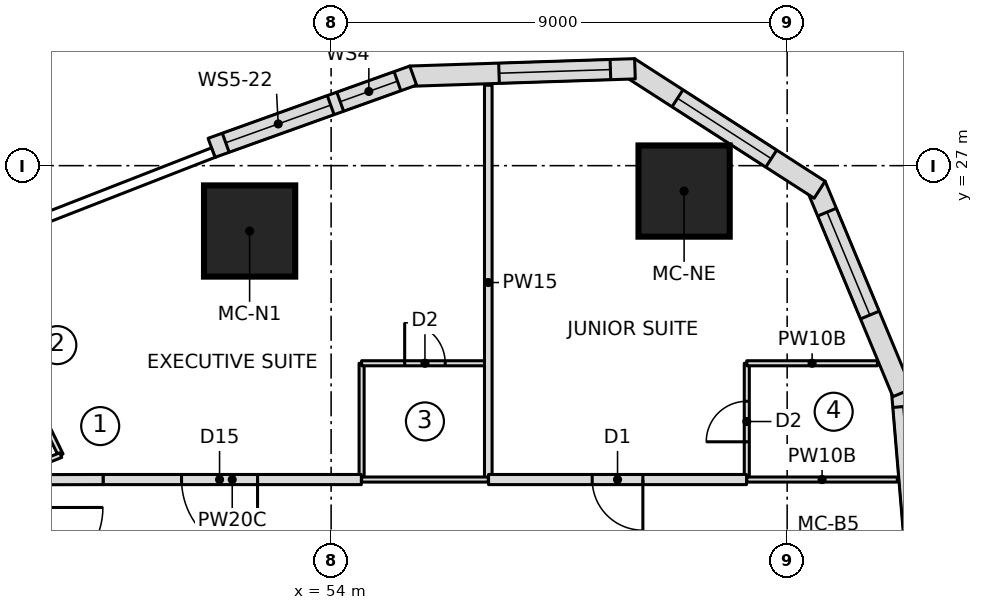
"""IFC4 building model, lengths in metres.
Left out: names, types, materials, properties, quantities, classifications, styles, units other than length and angle.
Written with IfcOpenShell. Run it as: python <this file> out.ifc"""

import sys

from ifc_helpers import new_model, si_unit, direction, frame, frame_2d, origin, origin_2d, place, context, subcontext, project, spatial, polyline, rectangle, outline, extrude, element, fill, save


model = new_model("IFC4")
c1 = context("Model", 3, precision=1e-05, world=origin(), true_north=direction((0.0, 1.0)))
c2 = subcontext(c1, "Body", "Model", "MODEL_VIEW")
j1 = project(units=[si_unit("LENGTHUNIT", "METRE"), si_unit("PLANEANGLEUNIT", "RADIAN")], contexts=[c1])
p1 = place(None, origin())
s1 = spatial("IfcSite", under=j1, at=p1, CompositionType="ELEMENT")
p2 = place(p1, origin())
s2 = spatial("IfcBuilding", under=s1, at=p2, CompositionType="ELEMENT")
p3 = place(p2, frame((0.0, 0.0, 50.25)))
s3 = spatial("IfcBuildingStorey", under=s2, at=p3, CompositionType="ELEMENT", Elevation=50.25)
for number, where, z_axis, x_axis in (
    (1, (60.966, 26.499, 0.0), (0.0, 0.0, 1.0), (1.0, 0.0, 0.0)),
    (2, (52.392, 25.71, 0.0), (0.0, 0.0, 1.0), (1.0, 0.0, 0.0)),
):
    element("IfcColumn", number, at=place(p3, frame(where, z_axis=z_axis, x_axis=x_axis)), inside=s3, PredefinedType="COLUMN", context=c2, shape_type="SweptSolid", body=[
        extrude(rectangle(XDim=1.8, YDim=1.8, at=origin_2d()), origin(), (0.0, 0.0, 1.0), 3.55),
    ])
p4 = place(p3, frame((65.603, 18.455, 0.0), z_axis=(0.0, 0.0, 1.0), x_axis=(-0.083793550906, 0.996483136248, 0.0)))
e3 = element("IfcWall", 3, at=p4, inside=s3, PredefinedType="NOTDEFINED", context=c2, shape_type="SweptSolid", body=[
    extrude(outline(polyline([(-0.002, -0.2), (4.136, -0.2), (4.074, 0.2), (0.002, 0.2), (-0.002, -0.2)])), origin(), (0.0, 0.0, 1.0), 3.25),
])
p5 = place(p4, frame((0.302, 0.0, 0.9)))
e4 = element("IfcOpeningElement", 4, at=p5, cuts=e3, PredefinedType="OPENING", context=c2, shape_type="SweptSolid", body=[
    extrude(rectangle(XDim=3.5, YDim=1.8, at=frame_2d((1.75, 0.9))), frame((0.0, 0.21, 0.0), z_axis=(0.0, -1.0, 0.0), x_axis=(1.0, 0.0, 0.0)), (0.0, 0.0, 1.0), 0.42),
])
p6 = place(p3, frame((65.259, 22.546, 0.0), z_axis=(0.0, 0.0, 1.0), x_axis=(-0.384372042685, 0.923178277908, 0.0)))
e5 = element("IfcWall", 5, at=p6, inside=s3, PredefinedType="NOTDEFINED", context=c2, shape_type="SweptSolid", body=[
    extrude(outline(polyline([(-0.031, -0.2), (4.408, -0.2), (4.283, 0.2), (0.031, 0.2), (-0.031, -0.2)])), origin(), (0.0, 0.0, 1.0), 3.25),
])
p7 = place(p6, frame((1.631, 0.0, 0.6)))
e6 = element("IfcOpeningElement", 6, at=p7, cuts=e5, PredefinedType="OPENING", context=c2, shape_type="SweptSolid", body=[
    extrude(outline(polyline([(0.0, 1.35), (0.084, 1.771), (0.322, 2.128), (0.679, 2.366), (1.1, 2.45), (1.521, 2.366), (1.878, 2.128), (2.116, 1.771), (2.2, 1.35), (2.2, 1.1), (2.116, 0.679), (1.878, 0.322), (1.521, 0.084), (1.1, 0.0), (0.679, 0.084), (0.322, 0.322), (0.084, 0.679), (0.0, 1.1), (0.0, 1.35)])), frame((0.0, 0.21, 0.0), z_axis=(0.0, -1.0, 0.0), x_axis=(1.0, 0.0, 0.0)), (0.0, 0.0, 1.0), 0.42),
])
p8 = place(p3, frame((63.588, 26.558, 0.0), z_axis=(0.0, 0.0, 1.0), x_axis=(-0.840937468718, 0.541132307025, 0.0)))
e7 = element("IfcWall", 7, at=p8, inside=s3, PredefinedType="NOTDEFINED", context=c2, shape_type="SweptSolid", body=[
    extrude(outline(polyline([(-0.062, -0.2), (4.409, -0.2), (4.284, 0.2), (0.062, 0.2), (-0.062, -0.2)])), origin(), (0.0, 0.0, 1.0), 3.25),
])
p9 = place(p8, frame((1.073, 0.0, 0.6)))
e8 = element("IfcOpeningElement", 8, at=p9, cuts=e7, PredefinedType="OPENING", context=c2, shape_type="SweptSolid", body=[
    extrude(outline(polyline([(0.0, 1.35), (0.084, 1.771), (0.322, 2.128), (0.679, 2.366), (1.1, 2.45), (1.521, 2.366), (1.878, 2.128), (2.116, 1.771), (2.2, 1.35), (2.2, 1.1), (2.116, 0.679), (1.878, 0.322), (1.521, 0.084), (1.1, 0.0), (0.679, 0.084), (0.322, 0.322), (0.084, 0.679), (0.0, 1.1), (0.0, 1.35)])), frame((0.0, 0.21, 0.0), z_axis=(0.0, -1.0, 0.0), x_axis=(1.0, 0.0, 0.0)), (0.0, 0.0, 1.0), 0.42),
])
p10 = place(p3, frame((59.934, 28.91, 0.0), z_axis=(0.0, 0.0, 1.0), x_axis=(-0.999463576228, -0.032749958686, 0.0)))
e9 = element("IfcWall", 9, at=p10, inside=s3, PredefinedType="NOTDEFINED", context=c2, shape_type="SweptSolid", body=[
    extrude(outline(polyline([(-0.062, -0.2), (4.378, -0.2), (4.315, 0.2), (0.062, 0.2), (-0.062, -0.2)])), origin(), (0.0, 0.0, 1.0), 3.25),
])
p11 = place(p10, frame((0.422, 0.0, 0.6)))
e10 = element("IfcOpeningElement", 10, at=p11, cuts=e9, PredefinedType="OPENING", context=c2, shape_type="SweptSolid", body=[
    extrude(outline(polyline([(0.0, 1.35), (0.084, 1.771), (0.322, 2.128), (0.679, 2.366), (1.1, 2.45), (1.521, 2.366), (1.878, 2.128), (2.116, 1.771), (2.2, 1.35), (2.2, 1.1), (2.116, 0.679), (1.878, 0.322), (1.521, 0.084), (1.1, 0.0), (0.679, 0.084), (0.322, 0.322), (0.084, 0.679), (0.0, 1.1), (0.0, 1.35)])), frame((0.0, 0.21, 0.0), z_axis=(0.0, -1.0, 0.0), x_axis=(1.0, 0.0, 0.0)), (0.0, 0.0, 1.0), 0.42),
])
p12 = place(p3, frame((55.59, 28.768, 0.0), z_axis=(0.0, 0.0, 1.0), x_axis=(-0.941339752885, -0.337460323057, 0.0)))
e11 = element("IfcWall", 11, at=p12, inside=s3, PredefinedType="NOTDEFINED", context=c2, shape_type="SweptSolid", body=[
    extrude(outline(polyline([(-0.031, -0.2), (4.196, -0.2), (4.196, 0.2), (0.031, 0.2), (-0.031, -0.2)])), origin(), (0.0, 0.0, 1.0), 3.25),
])
p13 = place(p12, frame((0.298, 0.0, 0.9)))
e12 = element("IfcOpeningElement", 12, at=p13, cuts=e11, PredefinedType="OPENING", context=c2, shape_type="SweptSolid", body=[
    extrude(rectangle(XDim=1.2, YDim=1.8, at=frame_2d((0.6, 0.9))), frame((0.0, 0.21, 0.0), z_axis=(0.0, -1.0, 0.0), x_axis=(1.0, 0.0, 0.0)), (0.0, 0.0, 1.0), 0.42),
])
p14 = place(p12, frame((1.698, 0.0, 0.9)))
e13 = element("IfcOpeningElement", 13, at=p14, cuts=e11, PredefinedType="OPENING", context=c2, shape_type="SweptSolid", body=[
    extrude(rectangle(XDim=2.2, YDim=1.8, at=frame_2d((1.1, 0.9))), frame((0.0, 0.21, 0.0), z_axis=(0.0, -1.0, 0.0), x_axis=(1.0, 0.0, 0.0)), (0.0, 0.0, 1.0), 0.42),
])
p15 = place(p3, frame((54.602, 20.8, 0.0), z_axis=(0.0, 0.0, 1.0), x_axis=(0.0, 1.0, 0.0)))
e14 = element("IfcWall", 14, at=p15, inside=s3, PredefinedType="PARTITIONING", context=c2, shape_type="SweptSolid", body=[
    extrude(rectangle(XDim=2.3, YDim=0.1, at=frame_2d((1.15, 0.0))), origin(), (0.0, 0.0, 1.0), 3.25),
])
p16 = place(p3, frame((54.602, 23.1, 0.0), z_axis=(0.0, 0.0, 1.0), x_axis=(1.0, 0.0, 0.0)))
e15 = element("IfcWall", 15, at=p16, inside=s3, PredefinedType="PARTITIONING", context=c2, shape_type="SweptSolid", body=[
    extrude(rectangle(XDim=2.5, YDim=0.1, at=frame_2d((1.25, 0.0))), origin(), (0.0, 0.0, 1.0), 3.25),
])
p17 = place(p16, frame((0.85, 0.0, 0.0)))
e16 = element("IfcOpeningElement", 16, at=p17, cuts=e15, PredefinedType="OPENING", context=c2, shape_type="SweptSolid", body=[
    extrude(rectangle(XDim=0.8, YDim=2.1, at=frame_2d((0.4, 1.05))), frame((0.0, 0.06, 0.0), z_axis=(0.0, -1.0, 0.0), x_axis=(1.0, 0.0, 0.0)), (0.0, 0.0, 1.0), 0.12),
])
p18 = place(p3, frame((62.203, 20.8, 0.0), z_axis=(0.0, 0.0, 1.0), x_axis=(0.0, 1.0, 0.0)))
e17 = element("IfcWall", 17, at=p18, inside=s3, PredefinedType="PARTITIONING", context=c2, shape_type="SweptSolid", body=[
    extrude(rectangle(XDim=2.3, YDim=0.1, at=frame_2d((1.15, 0.0))), origin(), (0.0, 0.0, 1.0), 3.25),
])
p19 = place(p18, frame((0.75, 0.0, 0.0)))
e18 = element("IfcOpeningElement", 18, at=p19, cuts=e17, PredefinedType="OPENING", context=c2, shape_type="SweptSolid", body=[
    extrude(rectangle(XDim=0.8, YDim=2.1, at=frame_2d((0.4, 1.05))), frame((0.0, 0.06, 0.0), z_axis=(0.0, -1.0, 0.0), x_axis=(1.0, 0.0, 0.0)), (0.0, 0.0, 1.0), 0.12),
])
p20 = place(p3, frame((62.203, 23.1, 0.0), z_axis=(0.0, 0.0, 1.0), x_axis=(1.0, 0.0, 0.0)))
e19 = element("IfcWall", 19, at=p20, inside=s3, PredefinedType="PARTITIONING", context=c2, shape_type="SweptSolid", body=[
    extrude(rectangle(XDim=2.578, YDim=0.1, at=frame_2d((1.289, 0.0))), origin(), (0.0, 0.0, 1.0), 3.25),
])
p21 = place(p3, frame((57.102, 20.8, 0.0), z_axis=(0.0, 0.0, 1.0), x_axis=(0.0, 1.0, 0.0)))
e20 = element("IfcWall", 20, at=p21, inside=s3, PredefinedType="PARTITIONING", context=c2, shape_type="SweptSolid", body=[
    extrude(rectangle(XDim=7.787, YDim=0.15, at=frame_2d((3.894, 0.0))), origin(), (0.0, 0.0, 1.0), 3.25),
])
p22 = place(p3, frame((47.655, 23.361, 0.0), z_axis=(0.0, 0.0, 1.0), x_axis=(0.438171240168, -0.898891519756, 0.0)))
e21 = element("IfcWall", 21, at=p22, inside=s3, PredefinedType="PARTITIONING", context=c2, shape_type="SweptSolid", body=[
    extrude(rectangle(XDim=2.306, YDim=0.1, at=frame_2d((1.153, 0.0))), origin(), (0.0, 0.0, 1.0), 3.25),
])
p23 = place(p3, frame((48.665, 21.288, 0.0), z_axis=(0.0, 0.0, 1.0), x_axis=(-0.928288495333, -0.371860819975, 0.0)))
e22 = element("IfcWall", 22, at=p23, inside=s3, PredefinedType="PARTITIONING", context=c2, shape_type="SweptSolid", body=[
    extrude(rectangle(XDim=2.507, YDim=0.1, at=frame_2d((1.253, 0.0))), origin(), (0.0, 0.0, 1.0), 3.25),
])
p24 = place(p23, frame((1.25, 0.0, 0.0)))
e23 = element("IfcOpeningElement", 23, at=p24, cuts=e22, PredefinedType="OPENING", context=c2, shape_type="SweptSolid", body=[
    extrude(rectangle(XDim=0.8, YDim=2.1, at=frame_2d((0.4, 1.05))), frame((0.0, 0.06, 0.0), z_axis=(0.0, -1.0, 0.0), x_axis=(1.0, 0.0, 0.0)), (0.0, 0.0, 1.0), 0.12),
])
p25 = place(p3, frame((54.597, 20.805, 0.0), z_axis=(0.0, 0.0, 1.0), x_axis=(-1.0, 0.0, 0.0)))
e24 = element("IfcWall", 24, at=p25, inside=s3, PredefinedType="PARTITIONING", context=c2, shape_type="SweptSolid", body=[
    extrude(rectangle(XDim=5.097, YDim=0.2, at=frame_2d((2.548, 0.0))), origin(), (0.0, 0.0, 1.0), 3.25),
])
p26 = place(p25, frame((2.048, 0.0, 0.0)))
e25 = element("IfcOpeningElement", 25, at=p26, cuts=e24, PredefinedType="OPENING", context=c2, shape_type="SweptSolid", body=[
    extrude(rectangle(XDim=1.5, YDim=2.1, at=frame_2d((0.75, 1.05))), frame((0.0, 0.11, 0.0), z_axis=(0.0, -1.0, 0.0), x_axis=(1.0, 0.0, 0.0)), (0.0, 0.0, 1.0), 0.22),
])
p27 = place(p3, frame((62.198, 20.805, 0.0), z_axis=(0.0, 0.0, 1.0), x_axis=(-1.0, 0.0, 0.0)))
e26 = element("IfcWall", 26, at=p27, inside=s3, PredefinedType="PARTITIONING", context=c2, shape_type="SweptSolid", body=[
    extrude(rectangle(XDim=5.092, YDim=0.2, at=frame_2d((2.546, 0.0))), origin(), (0.0, 0.0, 1.0), 3.25),
])
p28 = place(p27, frame((2.046, 0.0, 0.0)))
e27 = element("IfcOpeningElement", 27, at=p28, cuts=e26, PredefinedType="OPENING", context=c2, shape_type="SweptSolid", body=[
    extrude(rectangle(XDim=1.0, YDim=2.1, at=frame_2d((0.5, 1.05))), frame((0.0, 0.11, 0.0), z_axis=(0.0, -1.0, 0.0), x_axis=(1.0, 0.0, 0.0)), (0.0, 0.0, 1.0), 0.22),
])
p29 = place(p3, frame((57.102, 20.805, 0.0), z_axis=(0.0, 0.0, 1.0), x_axis=(-1.0, 0.0, 0.0)))
e28 = element("IfcWall", 28, at=p29, inside=s3, PredefinedType="PARTITIONING", context=c2, shape_type="SweptSolid", body=[
    extrude(rectangle(XDim=2.5, YDim=0.1, at=frame_2d((1.25, 0.0))), origin(), (0.0, 0.0, 1.0), 3.25),
])
p30 = place(p3, frame((65.175, 20.805, 0.0), z_axis=(0.0, 0.0, 1.0), x_axis=(-1.0, 0.0, 0.0)))
e29 = element("IfcWall", 29, at=p30, inside=s3, PredefinedType="PARTITIONING", context=c2, shape_type="SweptSolid", body=[
    extrude(rectangle(XDim=2.971, YDim=0.1, at=frame_2d((1.486, 0.0))), origin(), (0.0, 0.0, 1.0), 3.25),
])
p31 = place(p3, frame((49.5, 20.805, 0.0), z_axis=(0.0, 0.0, 1.0), x_axis=(-0.999998104399, -0.001947099992, 0.0)))
e30 = element("IfcWall", 30, at=p31, inside=s3, PredefinedType="PARTITIONING", context=c2, shape_type="SweptSolid", body=[
    extrude(rectangle(XDim=1.505, YDim=0.2, at=frame_2d((0.752, 0.0))), origin(), (0.0, 0.0, 1.0), 3.25),
])
p32 = place(p5, origin())
e31 = element("IfcWindow", 31, at=p32, inside=s3, PartitioningType="SINGLE_PANEL", PredefinedType="WINDOW", context=c2, shape_type="SweptSolid", body=[
    extrude(rectangle(XDim=3.5, YDim=1.8, at=frame_2d((1.75, 0.9))), frame((0.0, 0.17, 0.0), z_axis=(0.0, -1.0, 0.0), x_axis=(1.0, 0.0, 0.0)), (0.0, 0.0, 1.0), 0.06),
])
fill(e4, e31)
p33 = place(p7, origin())
e32 = element("IfcWindow", 32, at=p33, inside=s3, PartitioningType="SINGLE_PANEL", PredefinedType="WINDOW", context=c2, shape_type="SweptSolid", body=[
    extrude(outline(polyline([(0.0, 1.35), (0.084, 1.771), (0.322, 2.128), (0.679, 2.366), (1.1, 2.45), (1.521, 2.366), (1.878, 2.128), (2.116, 1.771), (2.2, 1.35), (2.2, 1.1), (2.116, 0.679), (1.878, 0.322), (1.521, 0.084), (1.1, 0.0), (0.679, 0.084), (0.322, 0.322), (0.084, 0.679), (0.0, 1.1), (0.0, 1.35)])), frame((0.0, 0.17, 0.0), z_axis=(0.0, -1.0, 0.0), x_axis=(1.0, 0.0, 0.0)), (0.0, 0.0, 1.0), 0.06),
])
fill(e6, e32)
p34 = place(p9, origin())
e33 = element("IfcWindow", 33, at=p34, inside=s3, PartitioningType="SINGLE_PANEL", PredefinedType="WINDOW", context=c2, shape_type="SweptSolid", body=[
    extrude(outline(polyline([(0.0, 1.35), (0.084, 1.771), (0.322, 2.128), (0.679, 2.366), (1.1, 2.45), (1.521, 2.366), (1.878, 2.128), (2.116, 1.771), (2.2, 1.35), (2.2, 1.1), (2.116, 0.679), (1.878, 0.322), (1.521, 0.084), (1.1, 0.0), (0.679, 0.084), (0.322, 0.322), (0.084, 0.679), (0.0, 1.1), (0.0, 1.35)])), frame((0.0, 0.17, 0.0), z_axis=(0.0, -1.0, 0.0), x_axis=(1.0, 0.0, 0.0)), (0.0, 0.0, 1.0), 0.06),
])
fill(e8, e33)
p35 = place(p11, origin())
e34 = element("IfcWindow", 34, at=p35, inside=s3, PartitioningType="SINGLE_PANEL", PredefinedType="WINDOW", context=c2, shape_type="SweptSolid", body=[
    extrude(outline(polyline([(0.0, 1.35), (0.084, 1.771), (0.322, 2.128), (0.679, 2.366), (1.1, 2.45), (1.521, 2.366), (1.878, 2.128), (2.116, 1.771), (2.2, 1.35), (2.2, 1.1), (2.116, 0.679), (1.878, 0.322), (1.521, 0.084), (1.1, 0.0), (0.679, 0.084), (0.322, 0.322), (0.084, 0.679), (0.0, 1.1), (0.0, 1.35)])), frame((0.0, 0.17, 0.0), z_axis=(0.0, -1.0, 0.0), x_axis=(1.0, 0.0, 0.0)), (0.0, 0.0, 1.0), 0.06),
])
fill(e10, e34)
p36 = place(p13, origin())
e35 = element("IfcWindow", 35, at=p36, inside=s3, PartitioningType="SINGLE_PANEL", PredefinedType="WINDOW", context=c2, shape_type="SweptSolid", body=[
    extrude(rectangle(XDim=1.2, YDim=1.8, at=frame_2d((0.6, 0.9))), frame((0.0, 0.17, 0.0), z_axis=(0.0, -1.0, 0.0), x_axis=(1.0, 0.0, 0.0)), (0.0, 0.0, 1.0), 0.06),
])
fill(e12, e35)
p37 = place(p14, origin())
e36 = element("IfcWindow", 36, at=p37, inside=s3, PartitioningType="SINGLE_PANEL", PredefinedType="WINDOW", context=c2, shape_type="SweptSolid", body=[
    extrude(rectangle(XDim=2.2, YDim=1.8, at=frame_2d((1.1, 0.9))), frame((0.0, 0.17, 0.0), z_axis=(0.0, -1.0, 0.0), x_axis=(1.0, 0.0, 0.0)), (0.0, 0.0, 1.0), 0.06),
])
fill(e13, e36)
p38 = place(p17, origin())
e37 = element("IfcDoor", 37, at=p38, inside=s3, OperationType="SINGLE_SWING_LEFT", PredefinedType="DOOR", context=c2, shape_type="SweptSolid", body=[
    extrude(rectangle(XDim=0.8, YDim=2.1, at=frame_2d((0.4, 1.05))), frame((0.0, 0.025, 0.0), z_axis=(0.0, -1.0, 0.0), x_axis=(1.0, 0.0, 0.0)), (0.0, 0.0, 1.0), 0.05),
])
fill(e16, e37)
p39 = place(p19, origin())
e38 = element("IfcDoor", 38, at=p39, inside=s3, OperationType="SINGLE_SWING_LEFT", PredefinedType="DOOR", context=c2, shape_type="SweptSolid", body=[
    extrude(rectangle(XDim=0.8, YDim=2.1, at=frame_2d((0.4, 1.05))), frame((0.0, 0.025, 0.0), z_axis=(0.0, -1.0, 0.0), x_axis=(1.0, 0.0, 0.0)), (0.0, 0.0, 1.0), 0.05),
])
fill(e18, e38)
p40 = place(p26, origin())
e39 = element("IfcDoor", 39, at=p40, inside=s3, OperationType="DOUBLE_DOOR_SINGLE_SWING", PredefinedType="DOOR", context=c2, shape_type="SweptSolid", body=[
    extrude(rectangle(XDim=1.5, YDim=2.1, at=frame_2d((0.75, 1.05))), frame((0.0, 0.025, 0.0), z_axis=(0.0, -1.0, 0.0), x_axis=(1.0, 0.0, 0.0)), (0.0, 0.0, 1.0), 0.05),
])
fill(e25, e39)
p41 = place(p28, origin())
e40 = element("IfcDoor", 40, at=p41, inside=s3, OperationType="SINGLE_SWING_LEFT", PredefinedType="DOOR", context=c2, shape_type="SweptSolid", body=[
    extrude(rectangle(XDim=1.0, YDim=2.1, at=frame_2d((0.5, 1.05))), frame((0.0, 0.025, 0.0), z_axis=(0.0, -1.0, 0.0), x_axis=(1.0, 0.0, 0.0)), (0.0, 0.0, 1.0), 0.05),
])
fill(e27, e40)
save(model, sys.argv[1])
